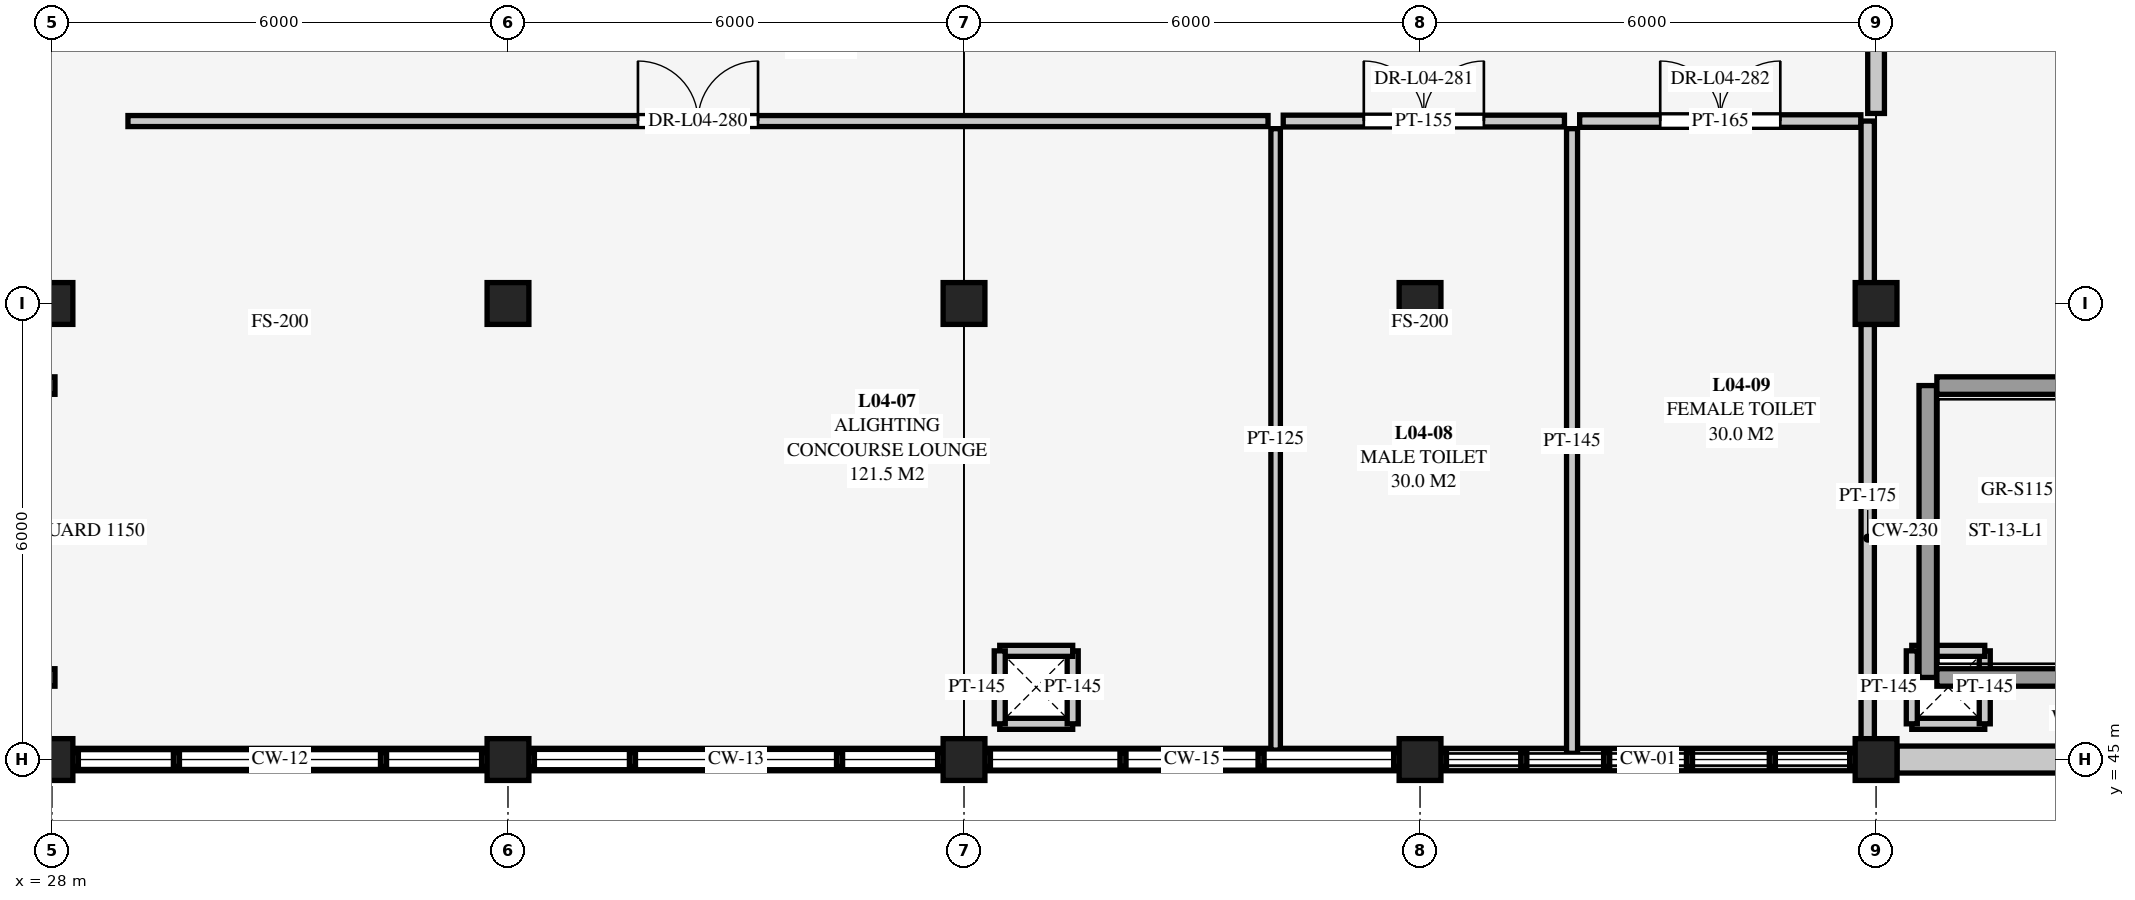
"""IFC4 building model, lengths in metres.
Left out: names, types, materials, properties, quantities, classifications, styles, units other than length and angle.
Written with IfcOpenShell. Run it as: python <this file> out.ifc"""

import sys

from ifc_helpers import new_model, si_unit, direction, frame, frame_2d, origin, origin_2d, place, context, subcontext, project, spatial, rectangle, extrude, element, fill, save


model = new_model("IFC4")
c1 = context("Model", 3, precision=1e-05, world=origin(), true_north=direction((0.0, 1.0)))
c2 = subcontext(c1, "Body", "Model", "MODEL_VIEW")
j1 = project(units=[si_unit("LENGTHUNIT", "METRE"), si_unit("PLANEANGLEUNIT", "RADIAN")], contexts=[c1])
p1 = place(None, origin())
s1 = spatial("IfcSite", under=j1, at=p1, CompositionType="ELEMENT")
p2 = place(p1, origin())
s2 = spatial("IfcBuilding", under=s1, at=p2, CompositionType="ELEMENT")
p3 = place(p2, frame((0.0, 0.0, 13.5)))
s3 = spatial("IfcBuildingStorey", under=s2, at=p3, CompositionType="ELEMENT", Elevation=13.5)
for number, where, z_axis, x_axis in (
    (1, (28.0, 45.0, 0.0), (0.0, 0.0, 1.0), (1.0, 0.0, 0.0)),
    (2, (28.0, 51.0, 0.0), (0.0, 0.0, 1.0), (1.0, 0.0, 0.0)),
    (3, (34.0, 45.0, 0.0), (0.0, 0.0, 1.0), (1.0, 0.0, 0.0)),
    (4, (34.0, 51.0, 0.0), (0.0, 0.0, 1.0), (1.0, 0.0, 0.0)),
    (5, (40.0, 45.0, 0.0), (0.0, 0.0, 1.0), (1.0, 0.0, 0.0)),
    (6, (40.0, 51.0, 0.0), (0.0, 0.0, 1.0), (1.0, 0.0, 0.0)),
    (7, (46.0, 45.0, 0.0), (0.0, 0.0, 1.0), (1.0, 0.0, 0.0)),
    (8, (46.0, 51.0, 0.0), (0.0, 0.0, 1.0), (1.0, 0.0, 0.0)),
    (9, (52.0, 45.0, 0.0), (0.0, 0.0, 1.0), (1.0, 0.0, 0.0)),
    (10, (52.0, 51.0, 0.0), (0.0, 0.0, 1.0), (1.0, 0.0, 0.0)),
):
    element("IfcColumn", number, at=place(p3, frame(where, z_axis=z_axis, x_axis=x_axis)), inside=s3, PredefinedType="COLUMN", context=c2, shape_type="SweptSolid", body=[
        extrude(rectangle(XDim=0.55, YDim=0.55, at=origin_2d()), origin(), (0.0, 0.0, 1.0), 4.5),
    ])
p4 = place(p3, frame((33.725, 45.0, 0.0), z_axis=(0.0, 0.0, 1.0), x_axis=(-1.0, 0.0, 0.0)))
e11 = element("IfcWall", 11, at=p4, inside=s3, PredefinedType="SOLIDWALL", context=c2, shape_type="SweptSolid", body=[
    extrude(rectangle(XDim=5.45, YDim=0.295, at=frame_2d((2.725, 0.0))), origin(), (0.0, 0.0, 1.0), 0.31),
])
p5 = place(p3, frame((39.725, 45.0, 0.0), z_axis=(0.0, 0.0, 1.0), x_axis=(-1.0, 0.0, 0.0)))
e12 = element("IfcWall", 12, at=p5, inside=s3, PredefinedType="SOLIDWALL", context=c2, shape_type="SweptSolid", body=[
    extrude(rectangle(XDim=5.45, YDim=0.295, at=frame_2d((2.725, 0.0))), origin(), (0.0, 0.0, 1.0), 0.36),
])
p6 = place(p3, frame((45.725, 45.0, 0.0), z_axis=(0.0, 0.0, 1.0), x_axis=(-1.0, 0.0, 0.0)))
e13 = element("IfcWall", 13, at=p6, inside=s3, PredefinedType="SOLIDWALL", context=c2, shape_type="SweptSolid", body=[
    extrude(rectangle(XDim=5.45, YDim=0.295, at=frame_2d((2.725, 0.0))), origin(), (0.0, 0.0, 1.0), 0.46),
])
p7 = place(p3, frame((51.725, 45.0, 0.0), z_axis=(0.0, 0.0, 1.0), x_axis=(-1.0, 0.0, 0.0)))
e14 = element("IfcWall", 14, at=p7, inside=s3, PredefinedType="SOLIDWALL", context=c2, shape_type="SweptSolid", body=[
    extrude(rectangle(XDim=5.45, YDim=0.295, at=frame_2d((2.725, 0.0))), origin(), (0.0, 0.0, 1.0), 0.16),
])
p8 = place(p3, frame((57.725, 45.0, 0.0), z_axis=(0.0, 0.0, 1.0), x_axis=(-1.0, 0.0, 0.0)))
e15 = element("IfcWall", 15, at=p8, inside=s3, PredefinedType="SOLIDWALL", context=c2, shape_type="SweptSolid", body=[
    extrude(rectangle(XDim=5.45, YDim=0.355, at=frame_2d((2.725, 0.0))), origin(), (0.0, 0.0, 1.0), 3.797),
])
p9 = place(p8, frame((2.225, 0.0, 1.35)))
e16 = element("IfcOpeningElement", 16, at=p9, cuts=e15, PredefinedType="OPENING", context=c2, shape_type="SweptSolid", body=[
    extrude(rectangle(XDim=1.0, YDim=1.35, at=frame_2d((0.5, 0.675))), frame((0.0, 0.188, 0.0), z_axis=(0.0, -1.0, 0.0), x_axis=(1.0, 0.0, 0.0)), (0.0, 0.0, 1.0), 0.375),
])
for number, where, z_axis, x_axis in (
    (17, (40.47, 45.47, 0.0), (0.0, 0.0, 1.0), (1.0, 0.0, 0.0)),
    (18, (41.43, 45.47, 0.0), (0.0, 0.0, 1.0), (0.0, 1.0, 0.0)),
    (19, (41.43, 46.43, 0.0), (0.0, 0.0, 1.0), (-1.0, 0.0, 0.0)),
    (20, (40.47, 46.43, 0.0), (0.0, 0.0, 1.0), (0.0, -1.0, 0.0)),
):
    element("IfcWall", number, at=place(p3, frame(where, z_axis=z_axis, x_axis=x_axis)), inside=s3, PredefinedType="PARTITIONING", context=c2, shape_type="SweptSolid", body=[
        extrude(rectangle(XDim=0.96, YDim=0.145, at=frame_2d((0.48, 0.0))), origin(), (0.0, 0.0, 1.0), 4.288),
    ])
for number, where, z_axis, x_axis in (
    (21, (52.47, 45.47, 0.0), (0.0, 0.0, 1.0), (1.0, 0.0, 0.0)),
    (22, (53.43, 45.47, 0.0), (0.0, 0.0, 1.0), (0.0, 1.0, 0.0)),
    (23, (53.43, 46.43, 0.0), (0.0, 0.0, 1.0), (-1.0, 0.0, 0.0)),
    (24, (52.47, 46.43, 0.0), (0.0, 0.0, 1.0), (0.0, -1.0, 0.0)),
):
    element("IfcWall", number, at=place(p3, frame(where, z_axis=z_axis, x_axis=x_axis)), inside=s3, PredefinedType="PARTITIONING", context=c2, shape_type="SweptSolid", body=[
        extrude(rectangle(XDim=0.96, YDim=0.145, at=frame_2d((0.48, 0.0))), origin(), (0.0, 0.0, 1.0), 4.264),
    ])
for number, where, z_axis, x_axis in (
    (25, (22.8, 46.08, 0.0), (0.0, 0.0, 1.0), (1.0, 0.0, 0.0)),
    (26, (22.8, 49.92, 0.0), (0.0, 0.0, 1.0), (1.0, 0.0, 0.0)),
):
    element("IfcWall", number, at=place(p3, frame(where, z_axis=z_axis, x_axis=x_axis)), inside=s3, PredefinedType="SHEAR", context=c2, shape_type="SweptSolid", body=[
        extrude(rectangle(XDim=5.24, YDim=0.23, at=frame_2d((2.62, 0.0))), origin(), (0.0, 0.0, 1.0), 4.288),
    ])
p10 = place(p3, frame((52.68, 46.08, 0.0), z_axis=(0.0, 0.0, 1.0), x_axis=(0.0, 1.0, 0.0)))
e27 = element("IfcWall", 27, at=p10, inside=s3, PredefinedType="SHEAR", context=c2, shape_type="SweptSolid", body=[
    extrude(rectangle(XDim=3.84, YDim=0.23, at=frame_2d((1.92, 0.0))), origin(), (0.0, 0.0, 1.0), 4.264),
])
for number, where, z_axis, x_axis in (
    (28, (52.8, 46.08, 0.0), (0.0, 0.0, 1.0), (1.0, 0.0, 0.0)),
    (29, (52.8, 49.92, 0.0), (0.0, 0.0, 1.0), (1.0, 0.0, 0.0)),
):
    element("IfcWall", number, at=place(p3, frame(where, z_axis=z_axis, x_axis=x_axis)), inside=s3, PredefinedType="SHEAR", context=c2, shape_type="SweptSolid", body=[
        extrude(rectangle(XDim=5.24, YDim=0.23, at=frame_2d((2.62, 0.0))), origin(), (0.0, 0.0, 1.0), 4.264),
    ])
p11 = place(p3, frame((44.1, 45.124, 0.0), z_axis=(0.0, 0.0, 1.0), x_axis=(0.0, 1.0, 0.0)))
e30 = element("IfcWall", 30, at=p11, inside=s3, PredefinedType="PARTITIONING", context=c2, shape_type="SweptSolid", body=[
    extrude(rectangle(XDim=8.176, YDim=0.125, at=frame_2d((4.088, 0.0))), origin(), (0.0, 0.0, 1.0), 4.288),
])
p12 = place(p3, frame((29.0, 53.4, 0.0), z_axis=(0.0, 0.0, 1.0), x_axis=(1.0, 0.0, 0.0)))
e31 = element("IfcWall", 31, at=p12, inside=s3, PredefinedType="PARTITIONING", context=c2, shape_type="SweptSolid", body=[
    extrude(rectangle(XDim=15.0, YDim=0.145, at=frame_2d((7.5, 0.0))), origin(), (0.0, 0.0, 1.0), 4.288),
])
p13 = place(p12, frame((6.71, 0.0, 0.0)))
e32 = element("IfcOpeningElement", 32, at=p13, cuts=e31, PredefinedType="OPENING", context=c2, shape_type="SweptSolid", body=[
    extrude(rectangle(XDim=1.58, YDim=2.2, at=frame_2d((0.79, 1.1))), frame((0.0, 0.083, 0.0), z_axis=(0.0, -1.0, 0.0), x_axis=(1.0, 0.0, 0.0)), (0.0, 0.0, 1.0), 0.165),
])
p14 = place(p3, frame((48.0, 45.082, 0.0), z_axis=(0.0, 0.0, 1.0), x_axis=(0.0, 1.0, 0.0)))
e33 = element("IfcWall", 33, at=p14, inside=s3, PredefinedType="PARTITIONING", context=c2, shape_type="SweptSolid", body=[
    extrude(rectangle(XDim=8.218, YDim=0.145, at=frame_2d((4.109, 0.0))), origin(), (0.0, 0.0, 1.0), 3.933),
])
p15 = place(p3, frame((44.2, 53.4, 0.0), z_axis=(0.0, 0.0, 1.0), x_axis=(1.0, 0.0, 0.0)))
e34 = element("IfcWall", 34, at=p15, inside=s3, PredefinedType="PARTITIONING", context=c2, shape_type="SweptSolid", body=[
    extrude(rectangle(XDim=3.7, YDim=0.155, at=frame_2d((1.85, 0.0))), origin(), (0.0, 0.0, 1.0), 4.288),
])
p16 = place(p15, frame((1.06, 0.0, 0.0)))
e35 = element("IfcOpeningElement", 35, at=p16, cuts=e34, PredefinedType="OPENING", context=c2, shape_type="SweptSolid", body=[
    extrude(rectangle(XDim=1.58, YDim=2.2, at=frame_2d((0.79, 1.1))), frame((0.0, 0.088, 0.0), z_axis=(0.0, -1.0, 0.0), x_axis=(1.0, 0.0, 0.0)), (0.0, 0.0, 1.0), 0.175),
])
p17 = place(p3, frame((48.1, 53.4, 0.0), z_axis=(0.0, 0.0, 1.0), x_axis=(1.0, 0.0, 0.0)))
e36 = element("IfcWall", 36, at=p17, inside=s3, PredefinedType="PARTITIONING", context=c2, shape_type="SweptSolid", body=[
    extrude(rectangle(XDim=3.7, YDim=0.165, at=frame_2d((1.85, 0.0))), origin(), (0.0, 0.0, 1.0), 4.288),
])
p18 = place(p17, frame((1.06, 0.0, 0.0)))
e37 = element("IfcOpeningElement", 37, at=p18, cuts=e36, PredefinedType="OPENING", context=c2, shape_type="SweptSolid", body=[
    extrude(rectangle(XDim=1.58, YDim=2.2, at=frame_2d((0.79, 1.1))), frame((0.0, 0.093, 0.0), z_axis=(0.0, -1.0, 0.0), x_axis=(1.0, 0.0, 0.0)), (0.0, 0.0, 1.0), 0.185),
])
p19 = place(p3, frame((52.0, 53.5, 0.0), z_axis=(0.0, 0.0, 1.0), x_axis=(0.0, 1.0, 0.0)))
e38 = element("IfcWall", 38, at=p19, inside=s3, PredefinedType="SOLIDWALL", context=c2, shape_type="SweptSolid", body=[
    extrude(rectangle(XDim=2.723, YDim=0.22, at=frame_2d((1.361, 0.0))), origin(), (0.0, 0.0, 1.0), 3.793),
])
p20 = place(p19, frame((0.892, 0.0, 0.0)))
e39 = element("IfcOpeningElement", 39, at=p20, cuts=e38, PredefinedType="OPENING", context=c2, shape_type="SweptSolid", body=[
    extrude(rectangle(XDim=0.94, YDim=2.1, at=frame_2d((0.47, 1.05))), frame((0.0, 0.12, 0.0), z_axis=(0.0, -1.0, 0.0), x_axis=(1.0, 0.0, 0.0)), (0.0, 0.0, 1.0), 0.24),
])
p21 = place(p3, frame((51.89, 45.1, 0.0), z_axis=(0.0, 0.0, 1.0), x_axis=(0.0, 1.0, 0.0)))
e40 = element("IfcWall", 40, at=p21, inside=s3, PredefinedType="PARTITIONING", context=c2, shape_type="SweptSolid", body=[
    extrude(rectangle(XDim=5.625, YDim=0.175, at=frame_2d((2.812, 0.0))), origin(), (0.0, 0.0, 1.0), 3.656),
])
p22 = place(p3, frame((51.89, 50.725, 0.0), z_axis=(0.0, 0.0, 1.0), x_axis=(0.0, 1.0, 0.0)))
e41 = element("IfcWall", 41, at=p22, inside=s3, PredefinedType="PARTITIONING", context=c2, shape_type="SweptSolid", body=[
    extrude(rectangle(XDim=2.675, YDim=0.175, at=frame_2d((1.337, 0.0))), origin(), (0.0, 0.0, 1.0), 4.204),
])
p23 = place(p13, origin())
e42 = element("IfcDoor", 42, at=p23, inside=s3, OperationType="DOUBLE_DOOR_SINGLE_SWING", PredefinedType="DOOR", context=c2, shape_type="SweptSolid", body=[
    extrude(rectangle(XDim=1.58, YDim=2.2, at=frame_2d((0.79, 1.1))), frame((0.0, 0.025, 0.0), z_axis=(0.0, -1.0, 0.0), x_axis=(1.0, 0.0, 0.0)), (0.0, 0.0, 1.0), 0.05),
])
fill(e32, e42)
p24 = place(p16, origin())
e43 = element("IfcDoor", 43, at=p24, inside=s3, OperationType="DOUBLE_DOOR_SINGLE_SWING", PredefinedType="DOOR", context=c2, shape_type="SweptSolid", body=[
    extrude(rectangle(XDim=1.58, YDim=2.2, at=frame_2d((0.79, 1.1))), frame((0.0, 0.025, 0.0), z_axis=(0.0, -1.0, 0.0), x_axis=(1.0, 0.0, 0.0)), (0.0, 0.0, 1.0), 0.05),
])
fill(e35, e43)
p25 = place(p18, origin())
e44 = element("IfcDoor", 44, at=p25, inside=s3, OperationType="DOUBLE_DOOR_SINGLE_SWING", PredefinedType="DOOR", context=c2, shape_type="SweptSolid", body=[
    extrude(rectangle(XDim=1.58, YDim=2.2, at=frame_2d((0.79, 1.1))), frame((0.0, 0.025, 0.0), z_axis=(0.0, -1.0, 0.0), x_axis=(1.0, 0.0, 0.0)), (0.0, 0.0, 1.0), 0.05),
])
fill(e37, e44)
save(model, sys.argv[1])
